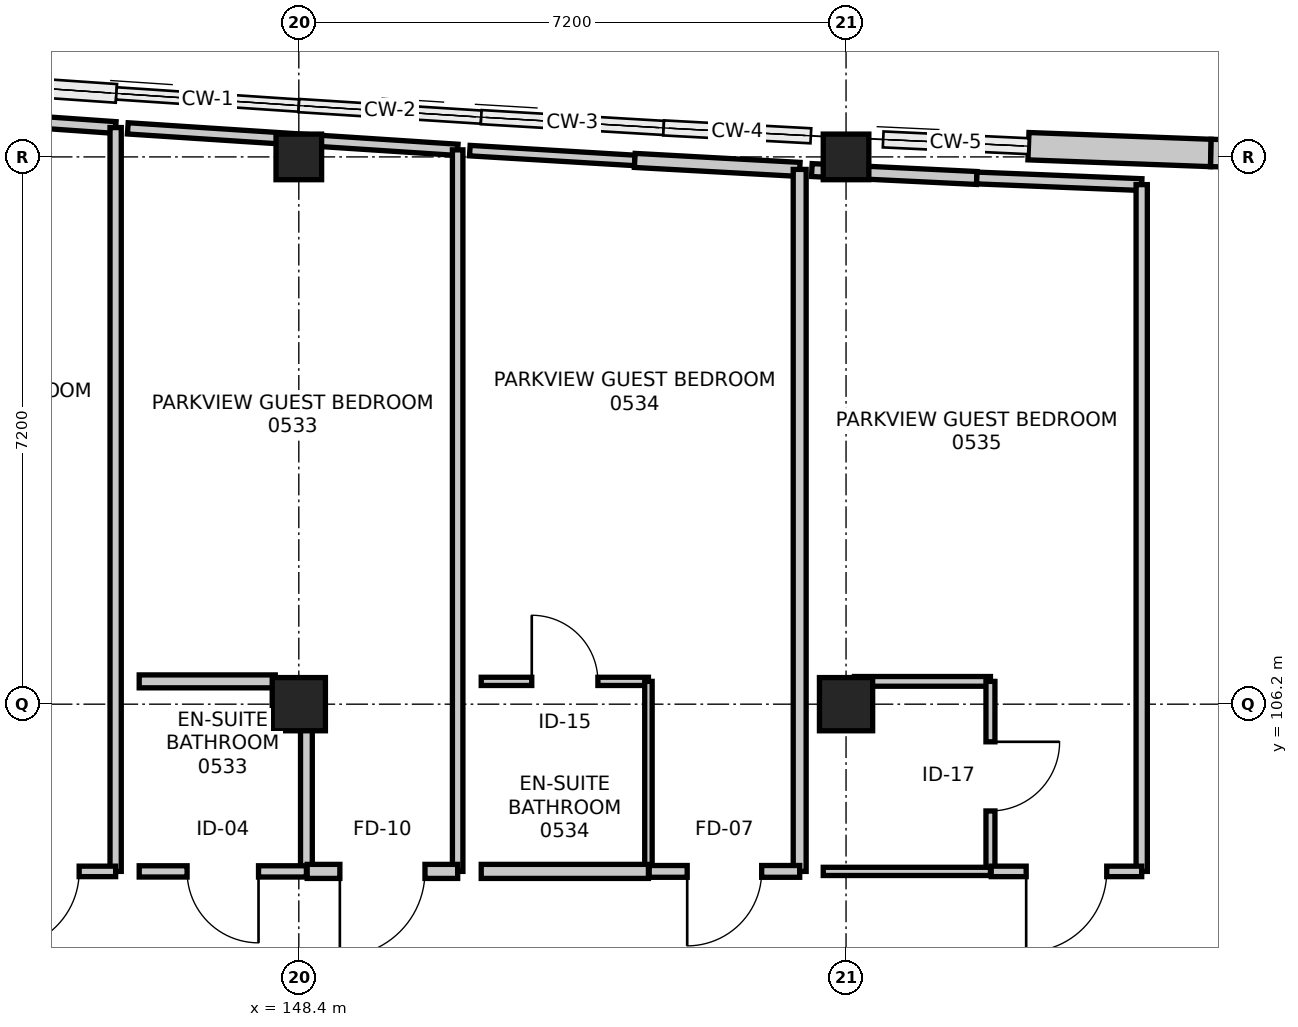
"""IFC4 building model, lengths in metres.
Left out: names, types, materials, properties, quantities, classifications, styles, units other than length and angle.
Written with IfcOpenShell. Run it as: python <this file> out.ifc"""

import sys

from ifc_helpers import new_model, si_unit, direction, frame, frame_2d, origin, origin_2d, place, context, subcontext, project, spatial, rectangle, extrude, element, fill, save


model = new_model("IFC4")
c1 = context("Model", 3, precision=1e-05, world=origin(), true_north=direction((0.0, 1.0)))
c2 = subcontext(c1, "Body", "Model", "MODEL_VIEW")
j1 = project(units=[si_unit("LENGTHUNIT", "METRE"), si_unit("PLANEANGLEUNIT", "RADIAN")], contexts=[c1])
p1 = place(None, origin())
s1 = spatial("IfcSite", under=j1, at=p1, CompositionType="ELEMENT")
p2 = place(p1, origin())
s2 = spatial("IfcBuilding", under=s1, at=p2, CompositionType="ELEMENT")
p3 = place(p2, frame((0.0, 0.0, 22.8)))
s3 = spatial("IfcBuildingStorey", under=s2, at=p3, CompositionType="ELEMENT", Elevation=22.8)
p4 = place(p3, frame((148.4, 106.2, 0.0), z_axis=(0.0, 0.0, 1.0), x_axis=(1.0, 0.0, 0.0)))
e1 = element("IfcColumn", 1, at=p4, inside=s3, PredefinedType="COLUMN", context=c2, shape_type="SweptSolid", body=[
    extrude(rectangle(XDim=0.7, YDim=0.7, at=origin_2d()), origin(), (0.0, 0.0, 1.0), 3.6),
])
p5 = place(p3, frame((148.4, 113.4, 0.0), z_axis=(0.0, 0.0, 1.0), x_axis=(1.0, 0.0, 0.0)))
e2 = element("IfcColumn", 2, at=p5, inside=s3, PredefinedType="COLUMN", context=c2, shape_type="SweptSolid", body=[
    extrude(rectangle(XDim=0.6, YDim=0.6, at=origin_2d()), origin(), (0.0, 0.0, 1.0), 3.6),
])
p6 = place(p3, frame((155.6, 106.2, 0.0), z_axis=(0.0, 0.0, 1.0), x_axis=(1.0, 0.0, 0.0)))
e3 = element("IfcColumn", 3, at=p6, inside=s3, PredefinedType="COLUMN", context=c2, shape_type="SweptSolid", body=[
    extrude(rectangle(XDim=0.7, YDim=0.7, at=origin_2d()), origin(), (0.0, 0.0, 1.0), 3.6),
])
p7 = place(p3, frame((155.6, 113.4, 0.0), z_axis=(0.0, 0.0, 1.0), x_axis=(1.0, 0.0, 0.0)))
e4 = element("IfcColumn", 4, at=p7, inside=s3, PredefinedType="COLUMN", context=c2, shape_type="SweptSolid", body=[
    extrude(rectangle(XDim=0.6, YDim=0.6, at=origin_2d()), origin(), (0.0, 0.0, 1.0), 3.6),
])
p8 = place(p3, frame((158.0, 113.541, 0.0), z_axis=(0.0, 0.0, 1.0), x_axis=(0.99930757318, -0.037207179225, 0.0)))
e5 = element("IfcWall", 5, at=p8, inside=s3, PredefinedType="STANDARD", context=c2, shape_type="SweptSolid", body=[
    extrude(rectangle(XDim=2.402, YDim=0.36, at=frame_2d((1.201, 0.0))), origin(), (0.0, 0.0, 1.0), 2.735),
])
p9 = place(p3, frame((160.4, 113.452, 0.0), z_axis=(0.0, 0.0, 1.0), x_axis=(0.999767568547, -0.021559426766, 0.0)))
e6 = element("IfcWall", 6, at=p9, inside=s3, PredefinedType="STANDARD", context=c2, shape_type="SweptSolid", body=[
    extrude(rectangle(XDim=2.401, YDim=0.36, at=frame_2d((1.2, 0.0))), origin(), (0.0, 0.0, 1.0), 2.735),
])
p10 = place(p3, frame((141.65, 114.089, 0.0), z_axis=(0.0, 0.0, 1.0), x_axis=(0.997568300588, -0.069695664585, 0.0)))
e7 = element("IfcWall", 7, at=p10, inside=s3, PredefinedType="PARTITIONING", context=c2, shape_type="SweptSolid", body=[
    extrude(rectangle(XDim=4.351, YDim=0.155, at=frame_2d((2.175, 0.0))), origin(), (0.0, 0.0, 1.0), 2.926),
])
p11 = place(p3, frame((145.99, 113.786, 0.0), z_axis=(0.0, 0.0, 1.0), x_axis=(0.0, -1.0, 0.0)))
e8 = element("IfcWall", 8, at=p11, inside=s3, PredefinedType="PARTITIONING", context=c2, shape_type="SweptSolid", body=[
    extrude(rectangle(XDim=9.786, YDim=0.148, at=frame_2d((4.893, 0.0))), origin(), (0.0, 0.0, 1.0), 2.735),
])
p12 = place(p3, frame((145.99, 104.0, 0.0), z_axis=(0.0, 0.0, 1.0), x_axis=(-1.0, 0.0, 0.0)))
e9 = element("IfcWall", 9, at=p12, inside=s3, PredefinedType="PARTITIONING", context=c2, shape_type="SweptSolid", body=[
    extrude(rectangle(XDim=1.98, YDim=0.138, at=frame_2d((0.99, 0.0))), origin(), (0.0, 0.0, 1.0), 3.35),
])
p13 = place(p12, frame((0.48, 0.0, 0.0)))
e10 = element("IfcOpeningElement", 10, at=p13, cuts=e9, PredefinedType="OPENING", context=c2, shape_type="SweptSolid", body=[
    extrude(rectangle(XDim=1.02, YDim=2.15, at=frame_2d((0.51, 1.075))), frame((0.0, 0.079, 0.0), z_axis=(0.0, -1.0, 0.0), x_axis=(1.0, 0.0, 0.0)), (0.0, 0.0, 1.0), 0.158),
])
p14 = place(p3, frame((146.3, 106.5, 0.0), z_axis=(0.0, 0.0, 1.0), x_axis=(1.0, 0.0, 0.0)))
e11 = element("IfcWall", 11, at=p14, inside=s3, PredefinedType="PARTITIONING", context=c2, shape_type="SweptSolid", body=[
    extrude(rectangle(XDim=1.79, YDim=0.17, at=frame_2d((0.895, 0.0))), origin(), (0.0, 0.0, 1.0), 2.735),
])
p15 = place(p3, frame((148.5, 106.09, 0.0), z_axis=(0.0, 0.0, 1.0), x_axis=(0.0, -1.0, 0.0)))
e12 = element("IfcWall", 12, at=p15, inside=s3, PredefinedType="PARTITIONING", context=c2, shape_type="SweptSolid", body=[
    extrude(rectangle(XDim=2.09, YDim=0.155, at=frame_2d((1.045, 0.0))), origin(), (0.0, 0.0, 1.0), 2.685),
])
p16 = place(p3, frame((148.5, 104.0, 0.0), z_axis=(0.0, 0.0, 1.0), x_axis=(-1.0, 0.0, 0.0)))
e13 = element("IfcWall", 13, at=p16, inside=s3, PredefinedType="PARTITIONING", context=c2, shape_type="SweptSolid", body=[
    extrude(rectangle(XDim=2.2, YDim=0.148, at=frame_2d((1.1, 0.0))), origin(), (0.0, 0.0, 1.0), 2.685),
])
p17 = place(p16, frame((0.63, 0.0, 0.0)))
e14 = element("IfcOpeningElement", 14, at=p17, cuts=e13, PredefinedType="OPENING", context=c2, shape_type="SweptSolid", body=[
    extrude(rectangle(XDim=0.94, YDim=2.12, at=frame_2d((0.47, 1.06))), frame((0.0, 0.084, 0.0), z_axis=(0.0, -1.0, 0.0), x_axis=(1.0, 0.0, 0.0)), (0.0, 0.0, 1.0), 0.168),
])
p18 = place(p3, frame((146.15, 113.775, 0.0), z_axis=(0.0, 0.0, 1.0), x_axis=(0.997888735161, -0.064946687663, 0.0)))
e15 = element("IfcWall", 15, at=p18, inside=s3, PredefinedType="PARTITIONING", context=c2, shape_type="SweptSolid", body=[
    extrude(rectangle(XDim=4.349, YDim=0.148, at=frame_2d((2.175, 0.0))), origin(), (0.0, 0.0, 1.0), 2.735),
])
p19 = place(p3, frame((150.49, 113.493, 0.0), z_axis=(0.0, 0.0, 1.0), x_axis=(0.0, -1.0, 0.0)))
e16 = element("IfcWall", 16, at=p19, inside=s3, PredefinedType="PARTITIONING", context=c2, shape_type="SweptSolid", body=[
    extrude(rectangle(XDim=9.493, YDim=0.138, at=frame_2d((4.747, 0.0))), origin(), (0.0, 0.0, 1.0), 2.735),
])
p20 = place(p3, frame((150.49, 104.0, 0.0), z_axis=(0.0, 0.0, 1.0), x_axis=(-1.0, 0.0, 0.0)))
e17 = element("IfcWall", 17, at=p20, inside=s3, PredefinedType="PARTITIONING", context=c2, shape_type="SweptSolid", body=[
    extrude(rectangle(XDim=1.98, YDim=0.185, at=frame_2d((0.99, 0.0))), origin(), (0.0, 0.0, 1.0), 2.685),
])
p21 = place(p20, frame((0.43, 0.0, 0.0)))
e18 = element("IfcOpeningElement", 18, at=p21, cuts=e17, PredefinedType="OPENING", context=c2, shape_type="SweptSolid", body=[
    extrude(rectangle(XDim=1.12, YDim=2.2, at=frame_2d((0.56, 1.1))), frame((0.0, 0.103, 0.0), z_axis=(0.0, -1.0, 0.0), x_axis=(1.0, 0.0, 0.0)), (0.0, 0.0, 1.0), 0.205),
])
p22 = place(p3, frame((150.8, 106.5, 0.0), z_axis=(0.0, 0.0, 1.0), x_axis=(1.0, 0.0, 0.0)))
e19 = element("IfcWall", 19, at=p22, inside=s3, PredefinedType="PARTITIONING", context=c2, shape_type="SweptSolid", body=[
    extrude(rectangle(XDim=2.2, YDim=0.108, at=frame_2d((1.1, 0.0))), origin(), (0.0, 0.0, 1.0), 3.35),
])
p23 = place(p22, frame((0.665, 0.0, 0.0)))
e20 = element("IfcOpeningElement", 20, at=p23, cuts=e19, PredefinedType="OPENING", context=c2, shape_type="SweptSolid", body=[
    extrude(rectangle(XDim=0.87, YDim=2.07, at=frame_2d((0.435, 1.035))), frame((0.0, 0.064, 0.0), z_axis=(0.0, -1.0, 0.0), x_axis=(1.0, 0.0, 0.0)), (0.0, 0.0, 1.0), 0.128),
])
p24 = place(p3, frame((153.0, 106.5, 0.0), z_axis=(0.0, 0.0, 1.0), x_axis=(0.0, -1.0, 0.0)))
e21 = element("IfcWall", 21, at=p24, inside=s3, PredefinedType="PARTITIONING", context=c2, shape_type="SweptSolid", body=[
    extrude(rectangle(XDim=2.5, YDim=0.098, at=frame_2d((1.25, 0.0))), origin(), (0.0, 0.0, 1.0), 2.735),
])
p25 = place(p3, frame((153.0, 104.0, 0.0), z_axis=(0.0, 0.0, 1.0), x_axis=(-1.0, 0.0, 0.0)))
e22 = element("IfcWall", 22, at=p25, inside=s3, PredefinedType="PARTITIONING", context=c2, shape_type="SweptSolid", body=[
    extrude(rectangle(XDim=2.2, YDim=0.185, at=frame_2d((1.1, 0.0))), origin(), (0.0, 0.0, 1.0), 3.35),
])
p26 = place(p3, frame((150.65, 113.483, 0.0), z_axis=(0.0, 0.0, 1.0), x_axis=(0.998240518683, -0.059294745625, 0.0)))
e23 = element("IfcWall", 23, at=p26, inside=s3, PredefinedType="PARTITIONING", context=c2, shape_type="SweptSolid", body=[
    extrude(rectangle(XDim=2.174, YDim=0.138, at=frame_2d((1.087, 0.0))), origin(), (0.0, 0.0, 1.0), 2.735),
])
p27 = place(p3, frame((152.82, 113.354, 0.0), z_axis=(0.0, 0.0, 1.0), x_axis=(0.998514485743, -0.054486895318, 0.0)))
e24 = element("IfcWall", 24, at=p27, inside=s3, PredefinedType="PARTITIONING", context=c2, shape_type="SweptSolid", body=[
    extrude(rectangle(XDim=2.173, YDim=0.185, at=frame_2d((1.086, 0.0))), origin(), (0.0, 0.0, 1.0), 2.735),
])
p28 = place(p3, frame((154.99, 113.235, 0.0), z_axis=(0.0, 0.0, 1.0), x_axis=(0.0, -1.0, 0.0)))
e25 = element("IfcWall", 25, at=p28, inside=s3, PredefinedType="PARTITIONING", context=c2, shape_type="SweptSolid", body=[
    extrude(rectangle(XDim=9.235, YDim=0.17, at=frame_2d((4.618, 0.0))), origin(), (0.0, 0.0, 1.0), 2.735),
])
p29 = place(p3, frame((154.99, 104.0, 0.0), z_axis=(0.0, 0.0, 1.0), x_axis=(-1.0, 0.0, 0.0)))
e26 = element("IfcWall", 26, at=p29, inside=s3, PredefinedType="PARTITIONING", context=c2, shape_type="SweptSolid", body=[
    extrude(rectangle(XDim=1.98, YDim=0.155, at=frame_2d((0.99, 0.0))), origin(), (0.0, 0.0, 1.0), 3.35),
])
p30 = place(p29, frame((0.5, 0.0, 0.0)))
e27 = element("IfcOpeningElement", 27, at=p30, cuts=e26, PredefinedType="OPENING", context=c2, shape_type="SweptSolid", body=[
    extrude(rectangle(XDim=0.98, YDim=2.15, at=frame_2d((0.49, 1.075))), frame((0.0, 0.087, 0.0), z_axis=(0.0, -1.0, 0.0), x_axis=(1.0, 0.0, 0.0)), (0.0, 0.0, 1.0), 0.175),
])
p31 = place(p3, frame((155.71, 106.5, 0.0), z_axis=(0.0, 0.0, 1.0), x_axis=(1.0, 0.0, 0.0)))
e28 = element("IfcWall", 28, at=p31, inside=s3, PredefinedType="PARTITIONING", context=c2, shape_type="SweptSolid", body=[
    extrude(rectangle(XDim=1.79, YDim=0.128, at=frame_2d((0.895, 0.0))), origin(), (0.0, 0.0, 1.0), 2.685),
])
p32 = place(p3, frame((157.5, 106.5, 0.0), z_axis=(0.0, 0.0, 1.0), x_axis=(0.0, -1.0, 0.0)))
e29 = element("IfcWall", 29, at=p32, inside=s3, PredefinedType="PARTITIONING", context=c2, shape_type="SweptSolid", body=[
    extrude(rectangle(XDim=2.5, YDim=0.118, at=frame_2d((1.25, 0.0))), origin(), (0.0, 0.0, 1.0), 2.735),
])
p33 = place(p32, frame((0.795, 0.0, 0.0)))
e30 = element("IfcOpeningElement", 30, at=p33, cuts=e29, PredefinedType="OPENING", context=c2, shape_type="SweptSolid", body=[
    extrude(rectangle(XDim=0.91, YDim=2.11, at=frame_2d((0.455, 1.055))), frame((0.0, 0.069, 0.0), z_axis=(0.0, -1.0, 0.0), x_axis=(1.0, 0.0, 0.0)), (0.0, 0.0, 1.0), 0.138),
])
p34 = place(p3, frame((157.5, 104.0, 0.0), z_axis=(0.0, 0.0, 1.0), x_axis=(-1.0, 0.0, 0.0)))
e31 = element("IfcWall", 31, at=p34, inside=s3, PredefinedType="PARTITIONING", context=c2, shape_type="SweptSolid", body=[
    extrude(rectangle(XDim=2.2, YDim=0.108, at=frame_2d((1.1, 0.0))), origin(), (0.0, 0.0, 1.0), 2.685),
])
p35 = place(p3, frame((155.15, 113.227, 0.0), z_axis=(0.0, 0.0, 1.0), x_axis=(0.998848221094, -0.047981571651, 0.0)))
e32 = element("IfcWall", 32, at=p35, inside=s3, PredefinedType="PARTITIONING", context=c2, shape_type="SweptSolid", body=[
    extrude(rectangle(XDim=2.173, YDim=0.17, at=frame_2d((1.086, 0.0))), origin(), (0.0, 0.0, 1.0), 2.685),
])
p36 = place(p3, frame((157.32, 113.123, 0.0), z_axis=(0.0, 0.0, 1.0), x_axis=(0.999198802232, -0.040021914221, 0.0)))
e33 = element("IfcWall", 33, at=p36, inside=s3, PredefinedType="PARTITIONING", context=c2, shape_type="SweptSolid", body=[
    extrude(rectangle(XDim=2.172, YDim=0.155, at=frame_2d((1.086, 0.0))), origin(), (0.0, 0.0, 1.0), 2.735),
])
p37 = place(p3, frame((159.49, 113.036, 0.0), z_axis=(0.0, 0.0, 1.0), x_axis=(0.0, -1.0, 0.0)))
e34 = element("IfcWall", 34, at=p37, inside=s3, PredefinedType="PARTITIONING", context=c2, shape_type="SweptSolid", body=[
    extrude(rectangle(XDim=9.036, YDim=0.148, at=frame_2d((4.518, 0.0))), origin(), (0.0, 0.0, 1.0), 2.735),
])
p38 = place(p3, frame((159.49, 104.0, 0.0), z_axis=(0.0, 0.0, 1.0), x_axis=(-1.0, 0.0, 0.0)))
e35 = element("IfcWall", 35, at=p38, inside=s3, PredefinedType="PARTITIONING", context=c2, shape_type="SweptSolid", body=[
    extrude(rectangle(XDim=1.98, YDim=0.138, at=frame_2d((0.99, 0.0))), origin(), (0.0, 0.0, 1.0), 3.35),
])
p39 = place(p38, frame((0.46, 0.0, 0.0)))
e36 = element("IfcOpeningElement", 36, at=p39, cuts=e35, PredefinedType="OPENING", context=c2, shape_type="SweptSolid", body=[
    extrude(rectangle(XDim=1.06, YDim=2.2, at=frame_2d((0.53, 1.1))), frame((0.0, 0.079, 0.0), z_axis=(0.0, -1.0, 0.0), x_axis=(1.0, 0.0, 0.0)), (0.0, 0.0, 1.0), 0.158),
])
p40 = place(p13, origin())
e37 = element("IfcDoor", 37, at=p40, inside=s3, OperationType="SINGLE_SWING_RIGHT", PredefinedType="DOOR", context=c2, shape_type="SweptSolid", body=[
    extrude(rectangle(XDim=1.02, YDim=2.15, at=frame_2d((0.51, 1.075))), frame((0.0, 0.025, 0.0), z_axis=(0.0, -1.0, 0.0), x_axis=(1.0, 0.0, 0.0)), (0.0, 0.0, 1.0), 0.05),
])
fill(e10, e37)
p41 = place(p17, origin())
e38 = element("IfcDoor", 38, at=p41, inside=s3, OperationType="SINGLE_SWING_LEFT", PredefinedType="DOOR", context=c2, shape_type="SweptSolid", body=[
    extrude(rectangle(XDim=0.94, YDim=2.12, at=frame_2d((0.47, 1.06))), frame((0.0, 0.025, 0.0), z_axis=(0.0, -1.0, 0.0), x_axis=(1.0, 0.0, 0.0)), (0.0, 0.0, 1.0), 0.05),
])
fill(e14, e38)
p42 = place(p21, origin())
e39 = element("IfcDoor", 39, at=p42, inside=s3, OperationType="SINGLE_SWING_RIGHT", PredefinedType="DOOR", context=c2, shape_type="SweptSolid", body=[
    extrude(rectangle(XDim=1.12, YDim=2.2, at=frame_2d((0.56, 1.1))), frame((0.0, 0.025, 0.0), z_axis=(0.0, -1.0, 0.0), x_axis=(1.0, 0.0, 0.0)), (0.0, 0.0, 1.0), 0.05),
])
fill(e18, e39)
p43 = place(p23, origin())
e40 = element("IfcDoor", 40, at=p43, inside=s3, OperationType="SINGLE_SWING_LEFT", PredefinedType="DOOR", context=c2, shape_type="SweptSolid", body=[
    extrude(rectangle(XDim=0.87, YDim=2.07, at=frame_2d((0.435, 1.035))), frame((0.0, 0.025, 0.0), z_axis=(0.0, -1.0, 0.0), x_axis=(1.0, 0.0, 0.0)), (0.0, 0.0, 1.0), 0.05),
])
fill(e20, e40)
p44 = place(p30, origin())
e41 = element("IfcDoor", 41, at=p44, inside=s3, OperationType="SINGLE_SWING_RIGHT", PredefinedType="DOOR", context=c2, shape_type="SweptSolid", body=[
    extrude(rectangle(XDim=0.98, YDim=2.15, at=frame_2d((0.49, 1.075))), frame((0.0, 0.025, 0.0), z_axis=(0.0, -1.0, 0.0), x_axis=(1.0, 0.0, 0.0)), (0.0, 0.0, 1.0), 0.05),
])
fill(e27, e41)
p45 = place(p33, origin())
e42 = element("IfcDoor", 42, at=p45, inside=s3, OperationType="SINGLE_SWING_LEFT", PredefinedType="DOOR", context=c2, shape_type="SweptSolid", body=[
    extrude(rectangle(XDim=0.91, YDim=2.11, at=frame_2d((0.455, 1.055))), frame((0.0, 0.025, 0.0), z_axis=(0.0, -1.0, 0.0), x_axis=(1.0, 0.0, 0.0)), (0.0, 0.0, 1.0), 0.05),
])
fill(e30, e42)
p46 = place(p39, origin())
e43 = element("IfcDoor", 43, at=p46, inside=s3, OperationType="SINGLE_SWING_RIGHT", PredefinedType="DOOR", context=c2, shape_type="SweptSolid", body=[
    extrude(rectangle(XDim=1.06, YDim=2.2, at=frame_2d((0.53, 1.1))), frame((0.0, 0.025, 0.0), z_axis=(0.0, -1.0, 0.0), x_axis=(1.0, 0.0, 0.0)), (0.0, 0.0, 1.0), 0.05),
])
fill(e36, e43)
save(model, sys.argv[1])
